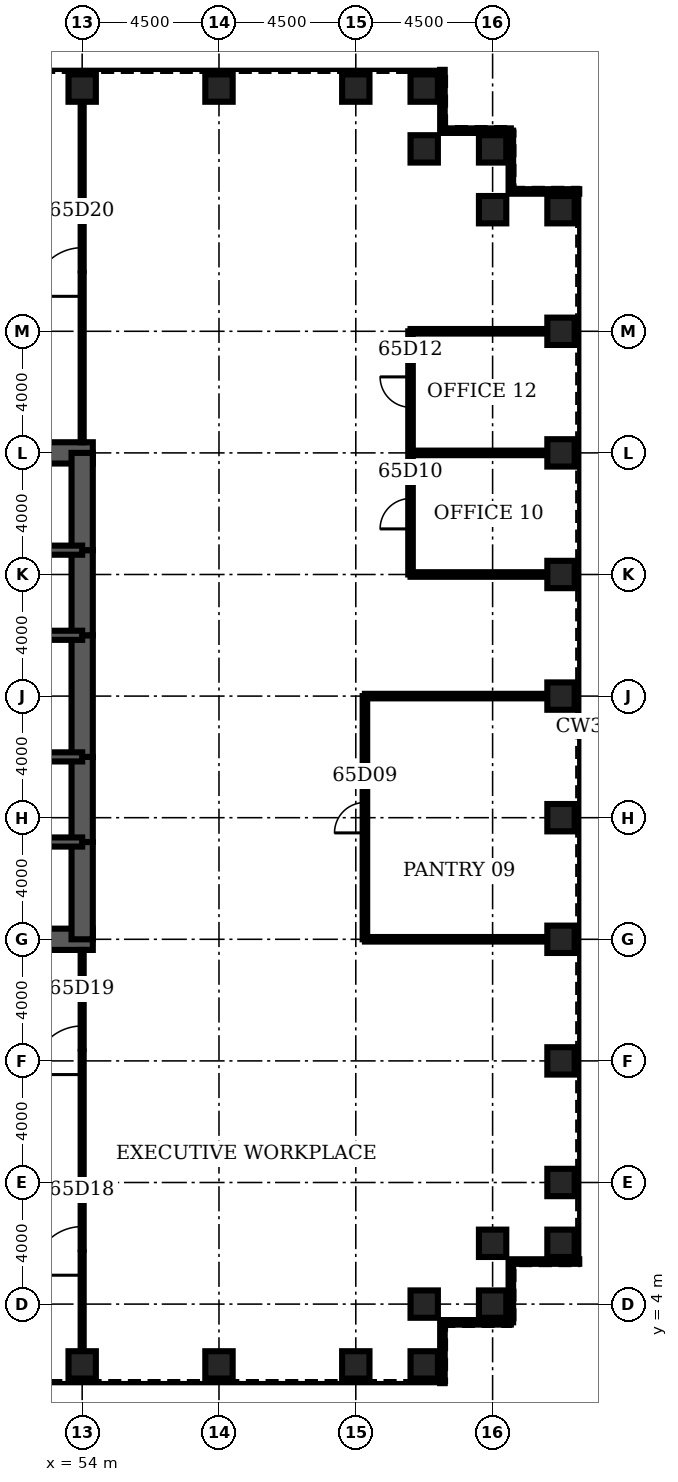
"""IFC4 building model, lengths in metres.
Left out: names, types, materials, properties, quantities, classifications, styles, units other than length and angle.
Written with IfcOpenShell. Run it as: python <this file> out.ifc"""

import sys

from ifc_helpers import new_model, si_unit, direction, frame, frame_2d, origin, origin_2d, place, context, subcontext, project, spatial, rectangle, hollow_rectangle, extrude, element, fill, save


model = new_model("IFC4")
c1 = context("Model", 3, precision=1e-05, world=origin(), true_north=direction((0.0, 1.0)))
c2 = subcontext(c1, "Body", "Model", "MODEL_VIEW")
j1 = project(units=[si_unit("LENGTHUNIT", "METRE"), si_unit("PLANEANGLEUNIT", "RADIAN")], contexts=[c1])
p1 = place(None, origin())
s1 = spatial("IfcSite", under=j1, at=p1, CompositionType="ELEMENT")
p2 = place(p1, origin())
s2 = spatial("IfcBuilding", under=s1, at=p2, CompositionType="ELEMENT")
p3 = place(p2, frame((0.0, 0.0, 287.9)))
s3 = spatial("IfcBuildingStorey", under=s2, at=p3, CompositionType="ELEMENT", Elevation=287.9)
for number, where, z_axis, x_axis in (
    (1, (54.0, 2.0, 0.0), (0.0, 0.0, 1.0), (0.0, 1.0, 0.0)),
    (2, (58.5, 2.0, 0.0), (0.0, 0.0, 1.0), (0.0, 1.0, 0.0)),
    (3, (63.0, 2.0, 0.0), (0.0, 0.0, 1.0), (0.0, 1.0, 0.0)),
    (4, (65.25, 2.0, 0.0), (0.0, 0.0, 1.0), (0.0, 1.0, 0.0)),
    (5, (65.25, 4.0, 0.0), (0.0, 0.0, 1.0), (0.0, 1.0, 0.0)),
    (6, (67.5, 4.0, 0.0), (0.0, 0.0, 1.0), (1.0, 0.0, 0.0)),
    (7, (67.5, 6.0, 0.0), (0.0, 0.0, 1.0), (1.0, 0.0, 0.0)),
    (8, (69.75, 6.0, 0.0), (0.0, 0.0, 1.0), (1.0, 0.0, 0.0)),
    (9, (69.75, 8.0, 0.0), (0.0, 0.0, 1.0), (1.0, 0.0, 0.0)),
    (10, (69.75, 12.0, 0.0), (0.0, 0.0, 1.0), (1.0, 0.0, 0.0)),
    (11, (69.75, 16.0, 0.0), (0.0, 0.0, 1.0), (1.0, 0.0, 0.0)),
    (12, (69.75, 20.0, 0.0), (0.0, 0.0, 1.0), (1.0, 0.0, 0.0)),
    (13, (69.75, 24.0, 0.0), (0.0, 0.0, 1.0), (1.0, 0.0, 0.0)),
    (14, (69.75, 28.0, 0.0), (0.0, 0.0, 1.0), (1.0, 0.0, 0.0)),
    (15, (69.75, 32.0, 0.0), (0.0, 0.0, 1.0), (1.0, 0.0, 0.0)),
    (16, (69.75, 36.0, 0.0), (0.0, 0.0, 1.0), (1.0, 0.0, 0.0)),
    (17, (69.75, 40.0, 0.0), (0.0, 0.0, 1.0), (1.0, 0.0, 0.0)),
    (18, (67.5, 40.0, 0.0), (0.0, 0.0, 1.0), (1.0, 0.0, 0.0)),
    (19, (67.5, 42.0, 0.0), (0.0, 0.0, 1.0), (1.0, 0.0, 0.0)),
    (20, (65.25, 42.0, 0.0), (0.0, 0.0, 1.0), (0.0, 1.0, 0.0)),
    (21, (65.25, 44.0, 0.0), (0.0, 0.0, 1.0), (0.0, 1.0, 0.0)),
    (22, (63.0, 44.0, 0.0), (0.0, 0.0, 1.0), (0.0, 1.0, 0.0)),
    (23, (58.5, 44.0, 0.0), (0.0, 0.0, 1.0), (0.0, 1.0, 0.0)),
    (24, (54.0, 44.0, 0.0), (0.0, 0.0, 1.0), (0.0, 1.0, 0.0)),
):
    element("IfcColumn", number, at=place(p3, frame(where, z_axis=z_axis, x_axis=x_axis)), inside=s3, PredefinedType="COLUMN", context=c2, shape_type="SweptSolid", body=[
        extrude(hollow_rectangle(XDim=0.9, YDim=0.9, WallThickness=0.07, at=origin_2d()), origin(), (0.0, 0.0, 1.0), 4.2),
    ])
for number, where, z_axis, x_axis in (
    (25, (45.0, 16.0, 0.0), (0.0, 0.0, 1.0), (1.0, 0.0, 0.0)),
    (26, (54.35, 32.0, 0.0), (0.0, 0.0, 1.0), (-1.0, 0.0, 0.0)),
):
    element("IfcWall", number, at=place(p3, frame(where, z_axis=z_axis, x_axis=x_axis)), inside=s3, PredefinedType="SHEAR", context=c2, shape_type="SweptSolid", body=[
        extrude(rectangle(XDim=9.35, YDim=0.7, at=frame_2d((4.675, 0.0))), origin(), (0.0, 0.0, 1.0), 4.2),
    ])
p4 = place(p3, frame((54.0, 16.0, 0.0), z_axis=(0.0, 0.0, 1.0), x_axis=(0.0, 1.0, 0.0)))
e27 = element("IfcWall", 27, at=p4, inside=s3, PredefinedType="SHEAR", context=c2, shape_type="SweptSolid", body=[
    extrude(rectangle(XDim=3.2, YDim=0.7, at=frame_2d((1.6, 0.0))), origin(), (0.0, 0.0, 1.0), 4.2),
])
p5 = place(p3, frame((54.0, 19.2, 0.0), z_axis=(0.0, 0.0, 1.0), x_axis=(0.0, 1.0, 0.0)))
e28 = element("IfcWall", 28, at=p5, inside=s3, PredefinedType="SHEAR", context=c2, shape_type="SweptSolid", body=[
    extrude(rectangle(XDim=2.8, YDim=0.7, at=frame_2d((1.4, 0.0))), origin(), (0.0, 0.0, 1.0), 4.2),
])
p6 = place(p5, frame((0.4, 0.0, 0.0)))
e29 = element("IfcOpeningElement", 29, at=p6, cuts=e28, PredefinedType="OPENING", context=c2, shape_type="SweptSolid", body=[
    extrude(rectangle(XDim=1.8, YDim=2.1, at=frame_2d((0.9, 1.05))), frame((0.0, 0.36, 0.0), z_axis=(0.0, -1.0, 0.0), x_axis=(1.0, 0.0, 0.0)), (0.0, 0.0, 1.0), 0.72),
])
p7 = place(p3, frame((54.0, 22.0, 0.0), z_axis=(0.0, 0.0, 1.0), x_axis=(0.0, 1.0, 0.0)))
e30 = element("IfcWall", 30, at=p7, inside=s3, PredefinedType="SHEAR", context=c2, shape_type="SweptSolid", body=[
    extrude(rectangle(XDim=4.0, YDim=0.7, at=frame_2d((2.0, 0.0))), origin(), (0.0, 0.0, 1.0), 4.2),
])
p8 = place(p3, frame((54.0, 26.0, 0.0), z_axis=(0.0, 0.0, 1.0), x_axis=(0.0, 1.0, 0.0)))
e31 = element("IfcWall", 31, at=p8, inside=s3, PredefinedType="SHEAR", context=c2, shape_type="SweptSolid", body=[
    extrude(rectangle(XDim=2.8, YDim=0.7, at=frame_2d((1.4, 0.0))), origin(), (0.0, 0.0, 1.0), 4.2),
])
p9 = place(p8, frame((0.6, 0.0, 0.0)))
e32 = element("IfcOpeningElement", 32, at=p9, cuts=e31, PredefinedType="OPENING", context=c2, shape_type="SweptSolid", body=[
    extrude(rectangle(XDim=1.8, YDim=2.1, at=frame_2d((0.9, 1.05))), frame((0.0, 0.36, 0.0), z_axis=(0.0, -1.0, 0.0), x_axis=(1.0, 0.0, 0.0)), (0.0, 0.0, 1.0), 0.72),
])
p10 = place(p3, frame((54.0, 28.8, 0.0), z_axis=(0.0, 0.0, 1.0), x_axis=(0.0, 1.0, 0.0)))
e33 = element("IfcWall", 33, at=p10, inside=s3, PredefinedType="SHEAR", context=c2, shape_type="SweptSolid", body=[
    extrude(rectangle(XDim=3.2, YDim=0.7, at=frame_2d((1.6, 0.0))), origin(), (0.0, 0.0, 1.0), 4.2),
])
p11 = place(p3, frame((45.0, 19.2, 0.0), z_axis=(0.0, 0.0, 1.0), x_axis=(1.0, 0.0, 0.0)))
e34 = element("IfcWall", 34, at=p11, inside=s3, PredefinedType="SOLIDWALL", context=c2, shape_type="SweptSolid", body=[
    extrude(rectangle(XDim=9.0, YDim=0.3, at=frame_2d((4.5, 0.0))), origin(), (0.0, 0.0, 1.0), 4.2),
])
p12 = place(p11, frame((7.35, 0.0, 0.0)))
e35 = element("IfcOpeningElement", 35, at=p12, cuts=e34, PredefinedType="OPENING", context=c2, shape_type="SweptSolid", body=[
    extrude(rectangle(XDim=1.0, YDim=2.1, at=frame_2d((0.5, 1.05))), frame((0.0, 0.16, 0.0), z_axis=(0.0, -1.0, 0.0), x_axis=(1.0, 0.0, 0.0)), (0.0, 0.0, 1.0), 0.32),
])
p13 = place(p3, frame((45.0, 28.8, 0.0), z_axis=(0.0, 0.0, 1.0), x_axis=(1.0, 0.0, 0.0)))
e36 = element("IfcWall", 36, at=p13, inside=s3, PredefinedType="SOLIDWALL", context=c2, shape_type="SweptSolid", body=[
    extrude(rectangle(XDim=9.0, YDim=0.3, at=frame_2d((4.5, 0.0))), origin(), (0.0, 0.0, 1.0), 4.2),
])
p14 = place(p13, frame((7.35, 0.0, 0.0)))
e37 = element("IfcOpeningElement", 37, at=p14, cuts=e36, PredefinedType="OPENING", context=c2, shape_type="SweptSolid", body=[
    extrude(rectangle(XDim=1.0, YDim=2.1, at=frame_2d((0.5, 1.05))), frame((0.0, 0.16, 0.0), z_axis=(0.0, -1.0, 0.0), x_axis=(1.0, 0.0, 0.0)), (0.0, 0.0, 1.0), 0.32),
])
p15 = place(p3, frame((48.0, 22.0, 0.0), z_axis=(0.0, 0.0, 1.0), x_axis=(1.0, 0.0, 0.0)))
e38 = element("IfcWall", 38, at=p15, inside=s3, PredefinedType="SOLIDWALL", context=c2, shape_type="SweptSolid", body=[
    extrude(rectangle(XDim=6.0, YDim=0.3, at=frame_2d((3.0, 0.0))), origin(), (0.0, 0.0, 1.0), 4.2),
])
p16 = place(p15, frame((2.0, 0.0, 0.0)))
e39 = element("IfcOpeningElement", 39, at=p16, cuts=e38, PredefinedType="OPENING", context=c2, shape_type="SweptSolid", body=[
    extrude(rectangle(XDim=1.0, YDim=2.1, at=frame_2d((0.5, 1.05))), frame((0.0, 0.16, 0.0), z_axis=(0.0, -1.0, 0.0), x_axis=(1.0, 0.0, 0.0)), (0.0, 0.0, 1.0), 0.32),
])
p17 = place(p3, frame((48.0, 26.0, 0.0), z_axis=(0.0, 0.0, 1.0), x_axis=(1.0, 0.0, 0.0)))
e40 = element("IfcWall", 40, at=p17, inside=s3, PredefinedType="SOLIDWALL", context=c2, shape_type="SweptSolid", body=[
    extrude(rectangle(XDim=6.0, YDim=0.3, at=frame_2d((3.0, 0.0))), origin(), (0.0, 0.0, 1.0), 4.2),
])
for number, where, z_axis, x_axis in (
    (41, (63.3, 16.0, 0.0), (0.0, 0.0, 1.0), (1.0, 0.0, 0.0)),
    (42, (63.3, 24.0, 0.0), (0.0, 0.0, 1.0), (1.0, 0.0, 0.0)),
):
    element("IfcWall", number, at=place(p3, frame(where, z_axis=z_axis, x_axis=x_axis)), inside=s3, PredefinedType="PARTITIONING", context=c2, shape_type="SweptSolid", body=[
        extrude(rectangle(XDim=6.0, YDim=0.15, at=frame_2d((3.0, 0.0))), origin(), (0.0, 0.0, 1.0), 3.0),
    ])
for number, where, z_axis, x_axis in (
    (43, (64.8, 28.0, 0.0), (0.0, 0.0, 1.0), (1.0, 0.0, 0.0)),
    (44, (64.8, 32.0, 0.0), (0.0, 0.0, 1.0), (1.0, 0.0, 0.0)),
    (45, (64.8, 36.0, 0.0), (0.0, 0.0, 1.0), (1.0, 0.0, 0.0)),
):
    element("IfcWall", number, at=place(p3, frame(where, z_axis=z_axis, x_axis=x_axis)), inside=s3, PredefinedType="PARTITIONING", context=c2, shape_type="SweptSolid", body=[
        extrude(rectangle(XDim=4.5, YDim=0.15, at=frame_2d((2.25, 0.0))), origin(), (0.0, 0.0, 1.0), 3.0),
    ])
p18 = place(p3, frame((54.0, 2.45, 0.0), z_axis=(0.0, 0.0, 1.0), x_axis=(0.0, 1.0, 0.0)))
e46 = element("IfcWall", 46, at=p18, inside=s3, PredefinedType="PARTITIONING", context=c2, shape_type="SweptSolid", body=[
    extrude(rectangle(XDim=13.2, YDim=0.1, at=frame_2d((6.6, 0.0))), origin(), (0.0, 0.0, 1.0), 3.0),
])
p19 = place(p18, frame((2.5, 0.0, 0.0)))
e47 = element("IfcOpeningElement", 47, at=p19, cuts=e46, PredefinedType="OPENING", context=c2, shape_type="SweptSolid", body=[
    extrude(rectangle(XDim=1.6, YDim=2.1, at=frame_2d((0.8, 1.05))), frame((0.0, 0.06, 0.0), z_axis=(0.0, -1.0, 0.0), x_axis=(1.0, 0.0, 0.0)), (0.0, 0.0, 1.0), 0.12),
])
p20 = place(p18, frame((9.1, 0.0, 0.0)))
e48 = element("IfcOpeningElement", 48, at=p20, cuts=e46, PredefinedType="OPENING", context=c2, shape_type="SweptSolid", body=[
    extrude(rectangle(XDim=1.6, YDim=2.1, at=frame_2d((0.8, 1.05))), frame((0.0, 0.06, 0.0), z_axis=(0.0, -1.0, 0.0), x_axis=(1.0, 0.0, 0.0)), (0.0, 0.0, 1.0), 0.12),
])
p21 = place(p3, frame((54.0, 32.35, 0.0), z_axis=(0.0, 0.0, 1.0), x_axis=(0.0, 1.0, 0.0)))
e49 = element("IfcWall", 49, at=p21, inside=s3, PredefinedType="PARTITIONING", context=c2, shape_type="SweptSolid", body=[
    extrude(rectangle(XDim=11.2, YDim=0.1, at=frame_2d((5.6, 0.0))), origin(), (0.0, 0.0, 1.0), 3.0),
])
p22 = place(p21, frame((4.8, 0.0, 0.0)))
e50 = element("IfcOpeningElement", 50, at=p22, cuts=e49, PredefinedType="OPENING", context=c2, shape_type="SweptSolid", body=[
    extrude(rectangle(XDim=1.6, YDim=2.1, at=frame_2d((0.8, 1.05))), frame((0.0, 0.06, 0.0), z_axis=(0.0, -1.0, 0.0), x_axis=(1.0, 0.0, 0.0)), (0.0, 0.0, 1.0), 0.12),
])
p23 = place(p3, frame((63.3, 16.0, 0.0), z_axis=(0.0, 0.0, 1.0), x_axis=(0.0, 1.0, 0.0)))
e51 = element("IfcWall", 51, at=p23, inside=s3, PredefinedType="PARTITIONING", context=c2, shape_type="SweptSolid", body=[
    extrude(rectangle(XDim=8.0, YDim=0.15, at=frame_2d((4.0, 0.0))), origin(), (0.0, 0.0, 1.0), 3.0),
])
p24 = place(p23, frame((3.5, 0.0, 0.0)))
e52 = element("IfcOpeningElement", 52, at=p24, cuts=e51, PredefinedType="OPENING", context=c2, shape_type="SweptSolid", body=[
    extrude(rectangle(XDim=1.0, YDim=2.1, at=frame_2d((0.5, 1.05))), frame((0.0, 0.085, 0.0), z_axis=(0.0, -1.0, 0.0), x_axis=(1.0, 0.0, 0.0)), (0.0, 0.0, 1.0), 0.17),
])
p25 = place(p3, frame((64.8, 28.0, 0.0), z_axis=(0.0, 0.0, 1.0), x_axis=(0.0, 1.0, 0.0)))
e53 = element("IfcWall", 53, at=p25, inside=s3, PredefinedType="PARTITIONING", context=c2, shape_type="SweptSolid", body=[
    extrude(rectangle(XDim=8.0, YDim=0.15, at=frame_2d((4.0, 0.0))), origin(), (0.0, 0.0, 1.0), 3.0),
])
p26 = place(p25, frame((1.5, 0.0, 0.0)))
e54 = element("IfcOpeningElement", 54, at=p26, cuts=e53, PredefinedType="OPENING", context=c2, shape_type="SweptSolid", body=[
    extrude(rectangle(XDim=1.0, YDim=2.1, at=frame_2d((0.5, 1.05))), frame((0.0, 0.085, 0.0), z_axis=(0.0, -1.0, 0.0), x_axis=(1.0, 0.0, 0.0)), (0.0, 0.0, 1.0), 0.17),
])
p27 = place(p25, frame((5.5, 0.0, 0.0)))
e55 = element("IfcOpeningElement", 55, at=p27, cuts=e53, PredefinedType="OPENING", context=c2, shape_type="SweptSolid", body=[
    extrude(rectangle(XDim=1.0, YDim=2.1, at=frame_2d((0.5, 1.05))), frame((0.0, 0.085, 0.0), z_axis=(0.0, -1.0, 0.0), x_axis=(1.0, 0.0, 0.0)), (0.0, 0.0, 1.0), 0.17),
])
p28 = place(p3, frame((65.85, 1.4, 0.0), z_axis=(0.0, 0.0, 1.0), x_axis=(0.0, 1.0, 0.0)))
e56 = element("IfcWall", 56, at=p28, inside=s3, PredefinedType="ELEMENTEDWALL", context=c2, shape_type="SweptSolid", body=[
    extrude(rectangle(XDim=2.0, YDim=0.15, at=frame_2d((1.0, 0.0))), origin(), (0.0, 0.0, 1.0), 4.04),
])
p29 = place(p3, frame((65.85, 3.4, 0.0), z_axis=(0.0, 0.0, 1.0), x_axis=(1.0, 0.0, 0.0)))
e57 = element("IfcWall", 57, at=p29, inside=s3, PredefinedType="ELEMENTEDWALL", context=c2, shape_type="SweptSolid", body=[
    extrude(rectangle(XDim=2.25, YDim=0.15, at=frame_2d((1.125, 0.0))), origin(), (0.0, 0.0, 1.0), 4.04),
])
p30 = place(p3, frame((68.1, 3.4, 0.0), z_axis=(0.0, 0.0, 1.0), x_axis=(0.0, 1.0, 0.0)))
e58 = element("IfcWall", 58, at=p30, inside=s3, PredefinedType="ELEMENTEDWALL", context=c2, shape_type="SweptSolid", body=[
    extrude(rectangle(XDim=2.0, YDim=0.15, at=frame_2d((1.0, 0.0))), origin(), (0.0, 0.0, 1.0), 4.04),
])
for number, where, z_axis, x_axis in (
    (59, (68.1, 5.4, 0.0), (0.0, 0.0, 1.0), (1.0, 0.0, 0.0)),
    (60, (70.35, 40.6, 0.0), (0.0, 0.0, 1.0), (-1.0, 0.0, 0.0)),
):
    element("IfcWall", number, at=place(p3, frame(where, z_axis=z_axis, x_axis=x_axis)), inside=s3, PredefinedType="ELEMENTEDWALL", context=c2, shape_type="SweptSolid", body=[
        extrude(rectangle(XDim=2.25, YDim=0.15, at=frame_2d((1.125, 0.0))), origin(), (0.0, 0.0, 1.0), 4.04),
    ])
p31 = place(p3, frame((68.1, 40.6, 0.0), z_axis=(0.0, 0.0, 1.0), x_axis=(0.0, 1.0, 0.0)))
e61 = element("IfcWall", 61, at=p31, inside=s3, PredefinedType="ELEMENTEDWALL", context=c2, shape_type="SweptSolid", body=[
    extrude(rectangle(XDim=2.0, YDim=0.15, at=frame_2d((1.0, 0.0))), origin(), (0.0, 0.0, 1.0), 4.04),
])
p32 = place(p3, frame((68.1, 42.6, 0.0), z_axis=(0.0, 0.0, 1.0), x_axis=(-1.0, 0.0, 0.0)))
e62 = element("IfcWall", 62, at=p32, inside=s3, PredefinedType="ELEMENTEDWALL", context=c2, shape_type="SweptSolid", body=[
    extrude(rectangle(XDim=2.25, YDim=0.15, at=frame_2d((1.125, 0.0))), origin(), (0.0, 0.0, 1.0), 4.04),
])
p33 = place(p3, frame((65.85, 42.6, 0.0), z_axis=(0.0, 0.0, 1.0), x_axis=(0.0, 1.0, 0.0)))
e63 = element("IfcWall", 63, at=p33, inside=s3, PredefinedType="ELEMENTEDWALL", context=c2, shape_type="SweptSolid", body=[
    extrude(rectangle(XDim=2.0, YDim=0.15, at=frame_2d((1.0, 0.0))), origin(), (0.0, 0.0, 1.0), 4.04),
])
p34 = place(p24, origin())
e64 = element("IfcDoor", 64, at=p34, inside=s3, OperationType="SINGLE_SWING_LEFT", PredefinedType="DOOR", context=c2, shape_type="SweptSolid", body=[
    extrude(rectangle(XDim=1.0, YDim=2.1, at=frame_2d((0.5, 1.05))), frame((0.0, 0.025, 0.0), z_axis=(0.0, -1.0, 0.0), x_axis=(1.0, 0.0, 0.0)), (0.0, 0.0, 1.0), 0.05),
])
fill(e52, e64)
p35 = place(p26, origin())
e65 = element("IfcDoor", 65, at=p35, inside=s3, OperationType="SINGLE_SWING_LEFT", PredefinedType="DOOR", context=c2, shape_type="SweptSolid", body=[
    extrude(rectangle(XDim=1.0, YDim=2.1, at=frame_2d((0.5, 1.05))), frame((0.0, 0.025, 0.0), z_axis=(0.0, -1.0, 0.0), x_axis=(1.0, 0.0, 0.0)), (0.0, 0.0, 1.0), 0.05),
])
fill(e54, e65)
p36 = place(p27, origin())
e66 = element("IfcDoor", 66, at=p36, inside=s3, OperationType="SINGLE_SWING_RIGHT", PredefinedType="DOOR", context=c2, shape_type="SweptSolid", body=[
    extrude(rectangle(XDim=1.0, YDim=2.1, at=frame_2d((0.5, 1.05))), frame((0.0, 0.025, 0.0), z_axis=(0.0, -1.0, 0.0), x_axis=(1.0, 0.0, 0.0)), (0.0, 0.0, 1.0), 0.05),
])
fill(e55, e66)
p37 = place(p19, origin())
e67 = element("IfcDoor", 67, at=p37, inside=s3, OperationType="SINGLE_SWING_LEFT", PredefinedType="DOOR", context=c2, shape_type="SweptSolid", body=[
    extrude(rectangle(XDim=1.6, YDim=2.1, at=frame_2d((0.8, 1.05))), frame((0.0, 0.025, 0.0), z_axis=(0.0, -1.0, 0.0), x_axis=(1.0, 0.0, 0.0)), (0.0, 0.0, 1.0), 0.05),
])
fill(e47, e67)
p38 = place(p20, origin())
e68 = element("IfcDoor", 68, at=p38, inside=s3, OperationType="SINGLE_SWING_LEFT", PredefinedType="DOOR", context=c2, shape_type="SweptSolid", body=[
    extrude(rectangle(XDim=1.6, YDim=2.1, at=frame_2d((0.8, 1.05))), frame((0.0, 0.025, 0.0), z_axis=(0.0, -1.0, 0.0), x_axis=(1.0, 0.0, 0.0)), (0.0, 0.0, 1.0), 0.05),
])
fill(e48, e68)
p39 = place(p22, origin())
e69 = element("IfcDoor", 69, at=p39, inside=s3, OperationType="SINGLE_SWING_LEFT", PredefinedType="DOOR", context=c2, shape_type="SweptSolid", body=[
    extrude(rectangle(XDim=1.6, YDim=2.1, at=frame_2d((0.8, 1.05))), frame((0.0, 0.025, 0.0), z_axis=(0.0, -1.0, 0.0), x_axis=(1.0, 0.0, 0.0)), (0.0, 0.0, 1.0), 0.05),
])
fill(e50, e69)
p40 = place(p12, origin())
e70 = element("IfcDoor", 70, at=p40, inside=s3, OperationType="SINGLE_SWING_RIGHT", PredefinedType="DOOR", context=c2, shape_type="SweptSolid", body=[
    extrude(rectangle(XDim=1.0, YDim=2.1, at=frame_2d((0.5, 1.05))), frame((0.0, 0.025, 0.0), z_axis=(0.0, -1.0, 0.0), x_axis=(1.0, 0.0, 0.0)), (0.0, 0.0, 1.0), 0.05),
])
fill(e35, e70)
p41 = place(p14, origin())
e71 = element("IfcDoor", 71, at=p41, inside=s3, OperationType="SINGLE_SWING_RIGHT", PredefinedType="DOOR", context=c2, shape_type="SweptSolid", body=[
    extrude(rectangle(XDim=1.0, YDim=2.1, at=frame_2d((0.5, 1.05))), frame((0.0, 0.025, 0.0), z_axis=(0.0, -1.0, 0.0), x_axis=(1.0, 0.0, 0.0)), (0.0, 0.0, 1.0), 0.05),
])
fill(e37, e71)
p42 = place(p6, origin())
e72 = element("IfcDoor", 72, at=p42, inside=s3, OperationType="SINGLE_SWING_LEFT", PredefinedType="DOOR", context=c2, shape_type="SweptSolid", body=[
    extrude(rectangle(XDim=1.8, YDim=2.1, at=frame_2d((0.9, 1.05))), frame((0.0, 0.35, 0.0), z_axis=(0.0, -1.0, 0.0), x_axis=(1.0, 0.0, 0.0)), (0.0, 0.0, 1.0), 0.699),
])
fill(e29, e72)
p43 = place(p9, origin())
e73 = element("IfcDoor", 73, at=p43, inside=s3, OperationType="SINGLE_SWING_LEFT", PredefinedType="DOOR", context=c2, shape_type="SweptSolid", body=[
    extrude(rectangle(XDim=1.8, YDim=2.1, at=frame_2d((0.9, 1.05))), frame((0.0, 0.35, 0.0), z_axis=(0.0, -1.0, 0.0), x_axis=(1.0, 0.0, 0.0)), (0.0, 0.0, 1.0), 0.699),
])
fill(e32, e73)
save(model, sys.argv[1])
